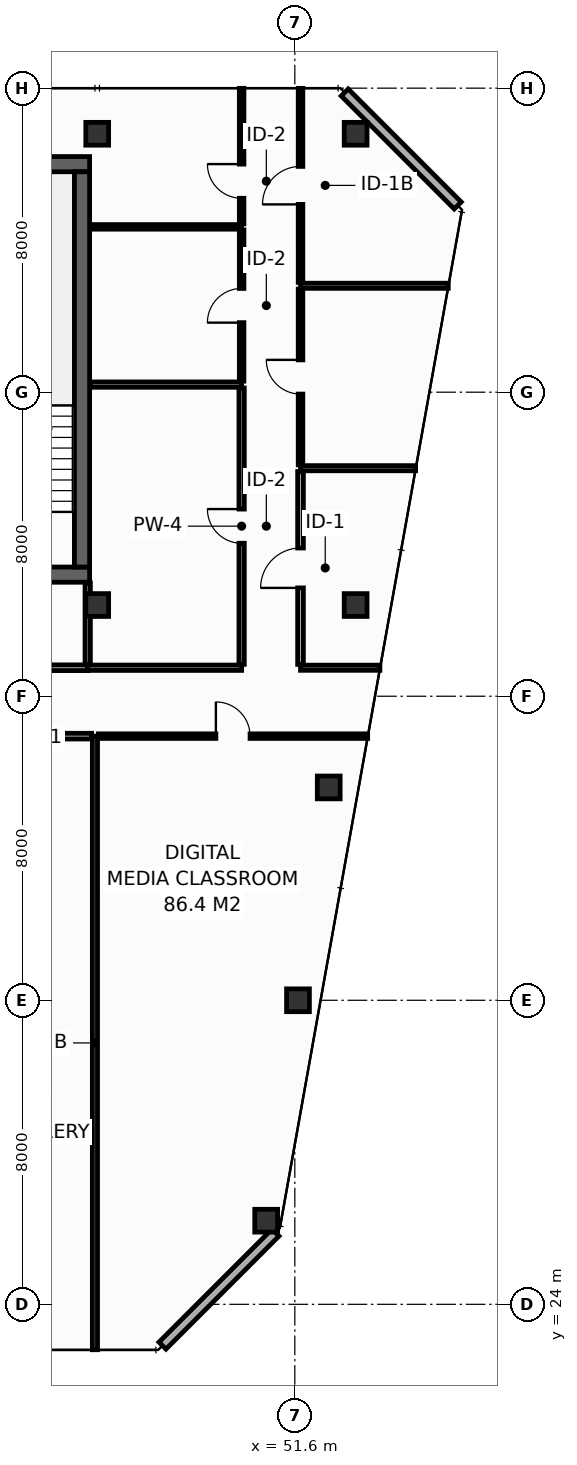
"""IFC4 building model, lengths in metres.
Left out: names, types, materials, properties, quantities, classifications, styles, units other than length and angle.
Written with IfcOpenShell. Run it as: python <this file> out.ifc"""

import sys

from ifc_helpers import new_model, si_unit, direction, frame, frame_2d, origin, origin_2d, place, context, subcontext, project, spatial, rectangle, hollow_rectangle, extrude, element, fill, save


model = new_model("IFC4")
c1 = context("Model", 3, precision=1e-05, world=origin(), true_north=direction((0.0, 1.0)))
c2 = subcontext(c1, "Body", "Model", "MODEL_VIEW")
j1 = project(units=[si_unit("LENGTHUNIT", "METRE"), si_unit("PLANEANGLEUNIT", "RADIAN")], contexts=[c1])
p1 = place(None, origin())
s1 = spatial("IfcSite", under=j1, at=p1, CompositionType="ELEMENT")
p2 = place(p1, origin())
s2 = spatial("IfcBuilding", under=s1, at=p2, CompositionType="ELEMENT")
p3 = place(p2, frame((0.0, 0.0, 272.4)))
s3 = spatial("IfcBuildingStorey", under=s2, at=p3, CompositionType="ELEMENT", Elevation=272.4)
p4 = place(p3, frame((13.7, 43.2, 0.0), z_axis=(0.0, 0.0, 1.0), x_axis=(1.0, 0.0, 0.0)))
e1 = element("IfcWall", 1, at=p4, inside=s3, PredefinedType="SHEAR", context=c2, shape_type="SweptSolid", body=[
    extrude(rectangle(XDim=32.5, YDim=0.4, at=frame_2d((16.25, 0.0))), origin(), (0.0, 0.0, 1.0), 3.35),
])
p5 = place(p4, frame((5.4, 0.0, 0.0)))
e2 = element("IfcOpeningElement", 2, at=p5, cuts=e1, PredefinedType="OPENING", context=c2, shape_type="SweptSolid", body=[
    extrude(rectangle(XDim=1.1, YDim=2.15, at=frame_2d((0.55, 1.075))), frame((0.0, 0.21, 0.0), z_axis=(0.0, -1.0, 0.0), x_axis=(1.0, 0.0, 0.0)), (0.0, 0.0, 1.0), 0.42),
])
p6 = place(p4, frame((25.6, 0.0, 0.0)))
e3 = element("IfcOpeningElement", 3, at=p6, cuts=e1, PredefinedType="OPENING", context=c2, shape_type="SweptSolid", body=[
    extrude(rectangle(XDim=1.1, YDim=2.15, at=frame_2d((0.55, 1.075))), frame((0.0, 0.21, 0.0), z_axis=(0.0, -1.0, 0.0), x_axis=(1.0, 0.0, 0.0)), (0.0, 0.0, 1.0), 0.42),
])
p7 = place(p3, frame((13.7, 54.0, 0.0), z_axis=(0.0, 0.0, 1.0), x_axis=(1.0, 0.0, 0.0)))
e4 = element("IfcWall", 4, at=p7, inside=s3, PredefinedType="SHEAR", context=c2, shape_type="SweptSolid", body=[
    extrude(rectangle(XDim=32.5, YDim=0.4, at=frame_2d((16.25, 0.0))), origin(), (0.0, 0.0, 1.0), 3.35),
])
p8 = place(p3, frame((46.0, 43.4, 0.0), z_axis=(0.0, 0.0, 1.0), x_axis=(0.0, 1.0, 0.0)))
e5 = element("IfcWall", 5, at=p8, inside=s3, PredefinedType="SHEAR", context=c2, shape_type="SweptSolid", body=[
    extrude(rectangle(XDim=10.4, YDim=0.4, at=frame_2d((5.2, 0.0))), origin(), (0.0, 0.0, 1.0), 3.35),
])
for number, where, z_axis, x_axis in (
    (6, (46.4, 54.8, 0.0), (0.0, 0.0, 1.0), (1.0, 0.0, 0.0)),
    (7, (53.2, 54.8, 0.0), (0.0, 0.0, 1.0), (1.0, 0.0, 0.0)),
    (8, (46.4, 42.4, 0.0), (0.0, 0.0, 1.0), (1.0, 0.0, 0.0)),
    (9, (53.2, 42.4, 0.0), (0.0, 0.0, 1.0), (1.0, 0.0, 0.0)),
    (10, (50.846, 26.2, 0.0), (0.0, 0.0, 1.0), (1.0, 0.0, 0.0)),
    (11, (51.683, 32.0, 0.0), (0.0, 0.0, 1.0), (1.0, 0.0, 0.0)),
    (12, (52.492, 37.6, 0.0), (0.0, 0.0, 1.0), (1.0, 0.0, 0.0)),
):
    element("IfcColumn", number, at=place(p3, frame(where, z_axis=z_axis, x_axis=x_axis)), inside=s3, PredefinedType="COLUMN", context=c2, shape_type="SweptSolid", body=[
        extrude(hollow_rectangle(XDim=0.6, YDim=0.6, WallThickness=0.028, at=origin_2d()), origin(), (0.0, 0.0, 1.0), 3.8),
    ])
for number, where, z_axis, x_axis in (
    (13, (48.117, 22.913, 0.0), (0.0, 0.0, 1.0), (0.707, 0.707, 0.0)),
    (14, (55.887, 52.913, 0.0), (0.0, 0.0, 1.0), (-0.707, 0.707, 0.0)),
):
    element("IfcWall", number, at=place(p3, frame(where, z_axis=z_axis, x_axis=x_axis)), inside=s3, PredefinedType="STANDARD", context=c2, shape_type="SweptSolid", body=[
        extrude(rectangle(XDim=4.206, YDim=0.26, at=frame_2d((2.103, 0.0))), origin(), (0.0, 0.0, 1.0), 3.35),
    ])
p9 = place(p3, frame((46.15, 40.75, 0.0), z_axis=(0.0, 0.0, 1.0), x_axis=(1.0, 0.0, 0.0)))
e15 = element("IfcWall", 15, at=p9, inside=s3, PredefinedType="PARTITIONING", context=c2, shape_type="SweptSolid", body=[
    extrude(rectangle(XDim=4.05, YDim=0.14, at=frame_2d((2.025, 0.0))), origin(), (0.0, 0.0, 1.0), 3.35),
])
p10 = place(p3, frame((46.15, 40.84, 0.0), z_axis=(0.0, 0.0, 1.0), x_axis=(0.0, 1.0, 0.0)))
e16 = element("IfcWall", 16, at=p10, inside=s3, PredefinedType="PARTITIONING", context=c2, shape_type="SweptSolid", body=[
    extrude(rectangle(XDim=2.14, YDim=0.14, at=frame_2d((1.07, 0.0))), origin(), (0.0, 0.0, 1.0), 3.35),
])
p11 = place(p3, frame((46.22, 48.2, 0.0), z_axis=(0.0, 0.0, 1.0), x_axis=(1.0, 0.0, 0.0)))
e17 = element("IfcWall", 17, at=p11, inside=s3, PredefinedType="PARTITIONING", context=c2, shape_type="SweptSolid", body=[
    extrude(rectangle(XDim=3.98, YDim=0.14, at=frame_2d((1.99, 0.0))), origin(), (0.0, 0.0, 1.0), 3.35),
])
p12 = place(p3, frame((50.2, 40.84, 0.0), z_axis=(0.0, 0.0, 1.0), x_axis=(0.0, 1.0, 0.0)))
e18 = element("IfcWall", 18, at=p12, inside=s3, PredefinedType="PARTITIONING", context=c2, shape_type="SweptSolid", body=[
    extrude(rectangle(XDim=7.27, YDim=0.14, at=frame_2d((3.635, 0.0))), origin(), (0.0, 0.0, 1.0), 2.747),
])
p13 = place(p12, frame((3.185, 0.0, 0.0)))
e19 = element("IfcOpeningElement", 19, at=p13, cuts=e18, PredefinedType="OPENING", context=c2, shape_type="SweptSolid", body=[
    extrude(rectangle(XDim=0.9, YDim=2.1, at=frame_2d((0.45, 1.05))), frame((0.0, 0.08, 0.0), z_axis=(0.0, -1.0, 0.0), x_axis=(1.0, 0.0, 0.0)), (0.0, 0.0, 1.0), 0.16),
])
p14 = place(p3, frame((46.22, 52.35, 0.0), z_axis=(0.0, 0.0, 1.0), x_axis=(1.0, 0.0, 0.0)))
e20 = element("IfcWall", 20, at=p14, inside=s3, PredefinedType="PARTITIONING", context=c2, shape_type="SweptSolid", body=[
    extrude(rectangle(XDim=3.98, YDim=0.12, at=frame_2d((1.99, 0.0))), origin(), (0.0, 0.0, 1.0), 3.35),
])
p15 = place(p3, frame((50.2, 48.29, 0.0), z_axis=(0.0, 0.0, 1.0), x_axis=(0.0, 1.0, 0.0)))
e21 = element("IfcWall", 21, at=p15, inside=s3, PredefinedType="PARTITIONING", context=c2, shape_type="SweptSolid", body=[
    extrude(rectangle(XDim=3.98, YDim=0.12, at=frame_2d((1.99, 0.0))), origin(), (0.0, 0.0, 1.0), 3.35),
])
p16 = place(p15, frame((1.54, 0.0, 0.0)))
e22 = element("IfcOpeningElement", 22, at=p16, cuts=e21, PredefinedType="OPENING", context=c2, shape_type="SweptSolid", body=[
    extrude(rectangle(XDim=0.9, YDim=2.1, at=frame_2d((0.45, 1.05))), frame((0.0, 0.07, 0.0), z_axis=(0.0, -1.0, 0.0), x_axis=(1.0, 0.0, 0.0)), (0.0, 0.0, 1.0), 0.14),
])
p17 = place(p3, frame((50.2, 52.43, 0.0), z_axis=(0.0, 0.0, 1.0), x_axis=(0.0, 1.0, 0.0)))
e23 = element("IfcWall", 23, at=p17, inside=s3, PredefinedType="PARTITIONING", context=c2, shape_type="SweptSolid", body=[
    extrude(rectangle(XDim=3.565, YDim=0.12, at=frame_2d((1.783, 0.0))), origin(), (0.0, 0.0, 1.0), 2.735),
])
p18 = place(p17, frame((0.672, 0.0, 0.0)))
e24 = element("IfcOpeningElement", 24, at=p18, cuts=e23, PredefinedType="OPENING", context=c2, shape_type="SweptSolid", body=[
    extrude(rectangle(XDim=0.9, YDim=2.1, at=frame_2d((0.45, 1.05))), frame((0.0, 0.07, 0.0), z_axis=(0.0, -1.0, 0.0), x_axis=(1.0, 0.0, 0.0)), (0.0, 0.0, 1.0), 0.14),
])
p19 = place(p3, frame((51.75, 40.75, 0.0), z_axis=(0.0, 0.0, 1.0), x_axis=(1.0, 0.0, 0.0)))
e25 = element("IfcWall", 25, at=p19, inside=s3, PredefinedType="PARTITIONING", context=c2, shape_type="SweptSolid", body=[
    extrude(rectangle(XDim=2.089, YDim=0.135, at=frame_2d((1.044, 0.0))), origin(), (0.0, 0.0, 1.0), 2.885),
])
p20 = place(p3, frame((51.75, 46.0, 0.0), z_axis=(0.0, 0.0, 1.0), x_axis=(1.0, 0.0, 0.0)))
e26 = element("IfcWall", 26, at=p20, inside=s3, PredefinedType="PARTITIONING", context=c2, shape_type="SweptSolid", body=[
    extrude(rectangle(XDim=3.028, YDim=0.135, at=frame_2d((1.514, 0.0))), origin(), (0.0, 0.0, 1.0), 2.747),
])
p21 = place(p3, frame((51.75, 50.8, 0.0), z_axis=(0.0, 0.0, 1.0), x_axis=(1.0, 0.0, 0.0)))
e27 = element("IfcWall", 27, at=p21, inside=s3, PredefinedType="PARTITIONING", context=c2, shape_type="SweptSolid", body=[
    extrude(rectangle(XDim=3.887, YDim=0.135, at=frame_2d((1.943, 0.0))), origin(), (0.0, 0.0, 1.0), 2.747),
])
p22 = place(p3, frame((51.75, 40.837, 0.0), z_axis=(0.0, 0.0, 1.0), x_axis=(0.0, 1.0, 0.0)))
e28 = element("IfcWall", 28, at=p22, inside=s3, PredefinedType="PARTITIONING", context=c2, shape_type="SweptSolid", body=[
    extrude(rectangle(XDim=5.075, YDim=0.15, at=frame_2d((2.538, 0.0))), origin(), (0.0, 0.0, 1.0), 2.747),
])
p23 = place(p22, frame((2.013, 0.0, 0.0)))
e29 = element("IfcOpeningElement", 29, at=p23, cuts=e28, PredefinedType="OPENING", context=c2, shape_type="SweptSolid", body=[
    extrude(rectangle(XDim=1.05, YDim=2.15, at=frame_2d((0.525, 1.075))), frame((0.0, 0.085, 0.0), z_axis=(0.0, -1.0, 0.0), x_axis=(1.0, 0.0, 0.0)), (0.0, 0.0, 1.0), 0.17),
])
p24 = place(p3, frame((51.75, 46.087, 0.0), z_axis=(0.0, 0.0, 1.0), x_axis=(0.0, 1.0, 0.0)))
e30 = element("IfcWall", 30, at=p24, inside=s3, PredefinedType="PARTITIONING", context=c2, shape_type="SweptSolid", body=[
    extrude(rectangle(XDim=4.625, YDim=0.12, at=frame_2d((2.312, 0.0))), origin(), (0.0, 0.0, 1.0), 3.35),
])
p25 = place(p24, frame((1.863, 0.0, 0.0)))
e31 = element("IfcOpeningElement", 31, at=p25, cuts=e30, PredefinedType="OPENING", context=c2, shape_type="SweptSolid", body=[
    extrude(rectangle(XDim=0.9, YDim=2.1, at=frame_2d((0.45, 1.05))), frame((0.0, 0.07, 0.0), z_axis=(0.0, -1.0, 0.0), x_axis=(1.0, 0.0, 0.0)), (0.0, 0.0, 1.0), 0.14),
])
p26 = place(p3, frame((51.75, 50.887, 0.0), z_axis=(0.0, 0.0, 1.0), x_axis=(0.0, 1.0, 0.0)))
e32 = element("IfcWall", 32, at=p26, inside=s3, PredefinedType="PARTITIONING", context=c2, shape_type="SweptSolid", body=[
    extrude(rectangle(XDim=5.108, YDim=0.12, at=frame_2d((2.554, 0.0))), origin(), (0.0, 0.0, 1.0), 2.735),
])
p27 = place(p26, frame((2.054, 0.0, 0.0)))
e33 = element("IfcOpeningElement", 33, at=p27, cuts=e32, PredefinedType="OPENING", context=c2, shape_type="SweptSolid", body=[
    extrude(rectangle(XDim=1.0, YDim=2.15, at=frame_2d((0.5, 1.075))), frame((0.0, 0.07, 0.0), z_axis=(0.0, -1.0, 0.0), x_axis=(1.0, 0.0, 0.0)), (0.0, 0.0, 1.0), 0.14),
])
p28 = place(p3, frame((40.995, 40.75, 0.0), z_axis=(0.0, 0.0, 1.0), x_axis=(1.0, 0.0, 0.0)))
e34 = element("IfcWall", 34, at=p28, inside=s3, PredefinedType="PARTITIONING", context=c2, shape_type="SweptSolid", body=[
    extrude(rectangle(XDim=5.155, YDim=0.15, at=frame_2d((2.577, 0.0))), origin(), (0.0, 0.0, 1.0), 3.35),
])
p29 = place(p28, frame((2.053, 0.0, 0.0)))
e35 = element("IfcOpeningElement", 35, at=p29, cuts=e34, PredefinedType="OPENING", context=c2, shape_type="SweptSolid", body=[
    extrude(rectangle(XDim=1.05, YDim=2.15, at=frame_2d((0.525, 1.075))), frame((0.0, 0.085, 0.0), z_axis=(0.0, -1.0, 0.0), x_axis=(1.0, 0.0, 0.0)), (0.0, 0.0, 1.0), 0.17),
])
p30 = place(p3, frame((46.34, 22.805, 0.0), z_axis=(0.0, 0.0, 1.0), x_axis=(0.0, 1.0, 0.0)))
e36 = element("IfcWall", 36, at=p30, inside=s3, PredefinedType="PARTITIONING", context=c2, shape_type="SweptSolid", body=[
    extrude(rectangle(XDim=16.145, YDim=0.135, at=frame_2d((8.073, 0.0))), origin(), (0.0, 0.0, 1.0), 1.535),
])
p31 = place(p3, frame((40.275, 38.95, 0.0), z_axis=(0.0, 0.0, 1.0), x_axis=(1.0, 0.0, 0.0)))
e37 = element("IfcWall", 37, at=p31, inside=s3, PredefinedType="PARTITIONING", context=c2, shape_type="SweptSolid", body=[
    extrude(rectangle(XDim=5.977, YDim=0.15, at=frame_2d((2.989, 0.0))), origin(), (0.0, 0.0, 1.0), 3.35),
])
p32 = place(p31, frame((2.464, 0.0, 0.0)))
e38 = element("IfcOpeningElement", 38, at=p32, cuts=e37, PredefinedType="OPENING", context=c2, shape_type="SweptSolid", body=[
    extrude(rectangle(XDim=1.05, YDim=2.15, at=frame_2d((0.525, 1.075))), frame((0.0, 0.085, 0.0), z_axis=(0.0, -1.0, 0.0), x_axis=(1.0, 0.0, 0.0)), (0.0, 0.0, 1.0), 0.17),
])
p33 = place(p3, frame((46.427, 38.95, 0.0), z_axis=(0.0, 0.0, 1.0), x_axis=(1.0, 0.0, 0.0)))
e39 = element("IfcWall", 39, at=p33, inside=s3, PredefinedType="PARTITIONING", context=c2, shape_type="SweptSolid", body=[
    extrude(rectangle(XDim=7.089, YDim=0.12, at=frame_2d((3.544, 0.0))), origin(), (0.0, 0.0, 1.0), 2.885),
])
p34 = place(p33, frame((3.095, 0.0, 0.0)))
e40 = element("IfcOpeningElement", 40, at=p34, cuts=e39, PredefinedType="OPENING", context=c2, shape_type="SweptSolid", body=[
    extrude(rectangle(XDim=0.9, YDim=2.1, at=frame_2d((0.45, 1.05))), frame((0.0, 0.07, 0.0), z_axis=(0.0, -1.0, 0.0), x_axis=(1.0, 0.0, 0.0)), (0.0, 0.0, 1.0), 0.14),
])
p35 = place(p13, origin())
e41 = element("IfcDoor", 41, at=p35, inside=s3, OperationType="SINGLE_SWING_RIGHT", PredefinedType="DOOR", context=c2, shape_type="SweptSolid", body=[
    extrude(rectangle(XDim=0.9, YDim=2.1, at=frame_2d((0.45, 1.05))), frame((0.0, 0.025, 0.0), z_axis=(0.0, -1.0, 0.0), x_axis=(1.0, 0.0, 0.0)), (0.0, 0.0, 1.0), 0.05),
])
fill(e19, e41)
p36 = place(p16, origin())
e42 = element("IfcDoor", 42, at=p36, inside=s3, OperationType="SINGLE_SWING_LEFT", PredefinedType="DOOR", context=c2, shape_type="SweptSolid", body=[
    extrude(rectangle(XDim=0.9, YDim=2.1, at=frame_2d((0.45, 1.05))), frame((0.0, 0.025, 0.0), z_axis=(0.0, -1.0, 0.0), x_axis=(1.0, 0.0, 0.0)), (0.0, 0.0, 1.0), 0.05),
])
fill(e22, e42)
p37 = place(p18, origin())
e43 = element("IfcDoor", 43, at=p37, inside=s3, OperationType="SINGLE_SWING_RIGHT", PredefinedType="DOOR", context=c2, shape_type="SweptSolid", body=[
    extrude(rectangle(XDim=0.9, YDim=2.1, at=frame_2d((0.45, 1.05))), frame((0.0, 0.025, 0.0), z_axis=(0.0, -1.0, 0.0), x_axis=(1.0, 0.0, 0.0)), (0.0, 0.0, 1.0), 0.05),
])
fill(e24, e43)
p38 = place(p23, origin())
e44 = element("IfcDoor", 44, at=p38, inside=s3, OperationType="SINGLE_SWING_LEFT", PredefinedType="DOOR", context=c2, shape_type="SweptSolid", body=[
    extrude(rectangle(XDim=1.05, YDim=2.15, at=frame_2d((0.525, 1.075))), frame((0.0, 0.025, 0.0), z_axis=(0.0, -1.0, 0.0), x_axis=(1.0, 0.0, 0.0)), (0.0, 0.0, 1.0), 0.05),
])
fill(e29, e44)
p39 = place(p25, origin())
e45 = element("IfcDoor", 45, at=p39, inside=s3, OperationType="SINGLE_SWING_RIGHT", PredefinedType="DOOR", context=c2, shape_type="SweptSolid", body=[
    extrude(rectangle(XDim=0.9, YDim=2.1, at=frame_2d((0.45, 1.05))), frame((0.0, 0.025, 0.0), z_axis=(0.0, -1.0, 0.0), x_axis=(1.0, 0.0, 0.0)), (0.0, 0.0, 1.0), 0.05),
])
fill(e31, e45)
p40 = place(p27, origin())
e46 = element("IfcDoor", 46, at=p40, inside=s3, OperationType="SINGLE_SWING_LEFT", PredefinedType="DOOR", context=c2, shape_type="SweptSolid", body=[
    extrude(rectangle(XDim=1.0, YDim=2.15, at=frame_2d((0.5, 1.075))), frame((0.0, 0.025, 0.0), z_axis=(0.0, -1.0, 0.0), x_axis=(1.0, 0.0, 0.0)), (0.0, 0.0, 1.0), 0.05),
])
fill(e33, e46)
p41 = place(p34, origin())
e47 = element("IfcDoor", 47, at=p41, inside=s3, OperationType="SINGLE_SWING_LEFT", PredefinedType="DOOR", context=c2, shape_type="SweptSolid", body=[
    extrude(rectangle(XDim=0.9, YDim=2.1, at=frame_2d((0.45, 1.05))), frame((0.0, 0.025, 0.0), z_axis=(0.0, -1.0, 0.0), x_axis=(1.0, 0.0, 0.0)), (0.0, 0.0, 1.0), 0.05),
])
fill(e40, e47)
save(model, sys.argv[1])
